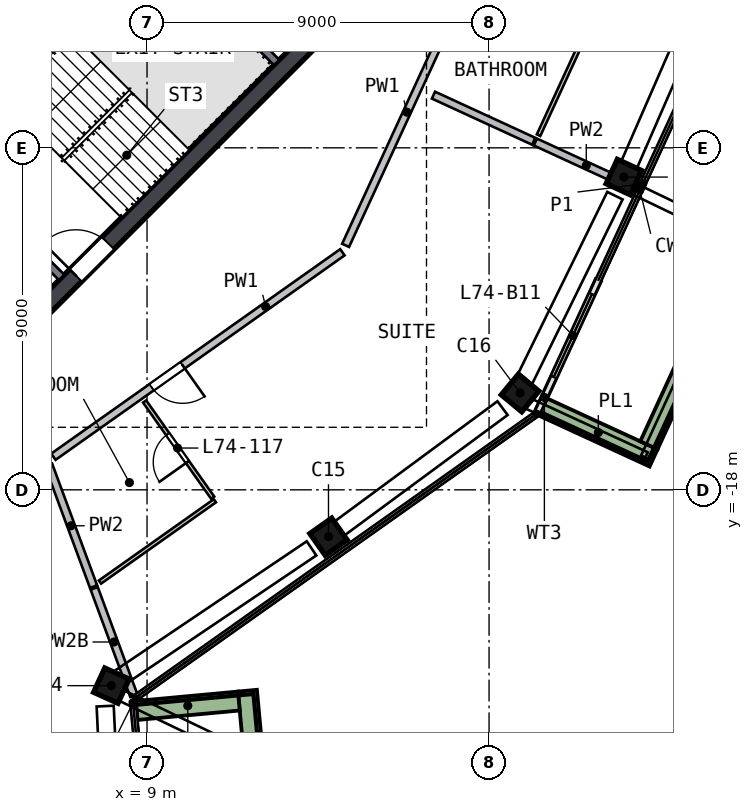
"""IFC4 building model, lengths in metres.
Left out: names, types, materials, properties, quantities, classifications, styles, units other than length and angle.
Written with IfcOpenShell. Run it as: python <this file> out.ifc"""

import sys

from ifc_helpers import new_model, si_unit, direction, frame, frame_2d, origin, origin_2d, place, context, subcontext, project, spatial, rectangle, extrude, element, fill, save


model = new_model("IFC4")
c1 = context("Model", 3, precision=1e-05, world=origin(), true_north=direction((0.0, 1.0)))
c2 = subcontext(c1, "Body", "Model", "MODEL_VIEW")
j1 = project(units=[si_unit("LENGTHUNIT", "METRE"), si_unit("PLANEANGLEUNIT", "RADIAN")], contexts=[c1])
p1 = place(None, origin())
s1 = spatial("IfcSite", under=j1, at=p1, CompositionType="ELEMENT")
p2 = place(p1, origin())
s2 = spatial("IfcBuilding", under=s1, at=p2, CompositionType="ELEMENT")
p3 = place(p2, frame((0.0, 0.0, 299.5)))
s3 = spatial("IfcBuildingStorey", under=s2, at=p3, CompositionType="ELEMENT", Elevation=299.5)
p4 = place(p3, frame((7.929, -23.2, 0.0), z_axis=(0.10991532, 0.038614787, 0.993190576), x_axis=(-0.410477569, -0.908289085, 0.080740963)))
e1 = element("IfcColumn", 1, at=p4, inside=s3, PredefinedType="COLUMN", context=c2, shape_type="SweptSolid", body=[
    extrude(rectangle(XDim=0.7, YDim=0.7, at=origin_2d()), origin(), (0.0, 0.0, 1.0), 3.212),
])
p5 = place(p3, frame((13.664, -19.313, 0.0), z_axis=(0.09133384, 0.065781659, 0.99364526), x_axis=(0.811187112, 0.573853007, -0.112553082)))
e2 = element("IfcColumn", 2, at=p5, inside=s3, PredefinedType="COLUMN", context=c2, shape_type="SweptSolid", body=[
    extrude(rectangle(XDim=0.7, YDim=0.7, at=origin_2d()), origin(), (0.0, 0.0, 1.0), 3.21),
])
p6 = place(p3, frame((18.728, -15.559, 0.0), z_axis=(0.073283156, 0.089627429, 0.993275643), x_axis=(-0.635237432, -0.763590768, 0.115769356)))
e3 = element("IfcColumn", 3, at=p6, inside=s3, PredefinedType="COLUMN", context=c2, shape_type="SweptSolid", body=[
    extrude(rectangle(XDim=0.7, YDim=0.7, at=origin_2d()), origin(), (0.0, 0.0, 1.0), 3.211),
])
p7 = place(p3, frame((21.49, -9.894, 0.0), z_axis=(0.046237437, 0.102589312, 0.993648596), x_axis=(0.41596114, 0.902393906, -0.11252363)))
e4 = element("IfcColumn", 4, at=p7, inside=s3, PredefinedType="COLUMN", context=c2, shape_type="SweptSolid", body=[
    extrude(rectangle(XDim=0.7, YDim=0.7, at=origin_2d()), origin(), (0.0, 0.0, 1.0), 3.21),
])
p8 = place(p3, frame((5.64, -13.841, 0.0), z_axis=(0.0, 0.0, 1.0), x_axis=(0.707106781, 0.707106781, 0.0)))
e5 = element("IfcWall", 5, at=p8, inside=s3, PredefinedType="SHEAR", context=c2, shape_type="SweptSolid", body=[
    extrude(rectangle(XDim=11.598, YDim=0.45, at=frame_2d((5.799, 0.0))), origin(), (0.0, 0.0, 1.0), 3.5),
])
p9 = place(p8, frame((2.099, 0.0, 0.0)))
e6 = element("IfcOpeningElement", 6, at=p9, cuts=e5, PredefinedType="OPENING", context=c2, shape_type="SweptSolid", body=[
    extrude(rectangle(XDim=1.2, YDim=2.1, at=frame_2d((0.6, 1.05))), frame((0.0, 0.235, 0.0), z_axis=(0.0, -1.0, 0.0), x_axis=(1.0, 0.0, 0.0)), (0.0, 0.0, 1.0), 0.47),
])
p10 = place(p3, frame((19.291, -15.927, 0.0), z_axis=(0.0, 0.0, 1.0), x_axis=(0.41817485, 0.908366553, 0.0)))
e7 = element("IfcWall", 7, at=p10, inside=s3, PredefinedType="SOLIDWALL", context=c2, shape_type="SweptSolid", body=[
    extrude(rectangle(XDim=3.787, YDim=0.15, at=frame_2d((1.893, 0.0))), origin(), (0.0, 0.0, 1.0), 2.525),
])
p11 = place(p10, frame((0.987, 0.0, 0.0)))
e8 = element("IfcOpeningElement", 8, at=p11, cuts=e7, PredefinedType="OPENING", context=c2, shape_type="SweptSolid", body=[
    extrude(rectangle(XDim=2.4, YDim=2.4, at=frame_2d((1.2, 1.2))), frame((0.0, 0.085, 0.0), z_axis=(0.0, -1.0, 0.0), x_axis=(1.0, 0.0, 0.0)), (0.0, 0.0, 1.0), 0.17),
])
p12 = place(p3, frame((12.51, -32.671, 0.0), z_axis=(0.0, 0.0, 1.0), x_axis=(-0.092007016, 0.995758359, 0.0)))
e9 = element("IfcWall", 9, at=p12, inside=s3, PredefinedType="SOLIDWALL", context=c2, shape_type="SweptSolid", body=[
    extrude(rectangle(XDim=9.425, YDim=0.5, at=frame_2d((4.713, 0.0))), origin(), (0.0, 0.0, 1.0), 0.7),
])
p13 = place(p3, frame((11.416, -23.558, 0.0), z_axis=(0.0, 0.0, 1.0), x_axis=(-0.995751125, -0.092085269, 0.0)))
e10 = element("IfcWall", 10, at=p13, inside=s3, PredefinedType="SOLIDWALL", context=c2, shape_type="SweptSolid", body=[
    extrude(rectangle(XDim=2.699, YDim=0.5, at=frame_2d((1.35, 0.0))), origin(), (0.0, 0.0, 1.0), 0.7),
])
p14 = place(p3, frame((19.423, -15.822, 0.0), z_axis=(0.0, 0.0, 1.0), x_axis=(0.908343202, -0.418225571, 0.0)))
e11 = element("IfcWall", 11, at=p14, inside=s3, PredefinedType="SOLIDWALL", context=c2, shape_type="SweptSolid", body=[
    extrude(rectangle(XDim=3.199, YDim=0.5, at=frame_2d((1.6, 0.0))), origin(), (0.0, 0.0, 1.0), 0.7),
])
p15 = place(p3, frame((22.206, -16.828, 0.0), z_axis=(0.0, 0.0, 1.0), x_axis=(0.418195112, 0.908357225, 0.0)))
e12 = element("IfcWall", 12, at=p15, inside=s3, PredefinedType="SOLIDWALL", context=c2, shape_type="SweptSolid", body=[
    extrude(rectangle(XDim=13.224, YDim=0.5, at=frame_2d((6.612, 0.0))), origin(), (0.0, 0.0, 1.0), 0.7),
])
p16 = place(p3, frame((9.629, -3.24, 0.0), z_axis=(0.0, 0.0, 1.0), x_axis=(-0.707120946, -0.707092617, 0.0)))
e13 = element("IfcWall", 13, at=p16, inside=s3, PredefinedType="SOLIDWALL", context=c2, shape_type="SweptSolid", body=[
    extrude(rectangle(XDim=8.618, YDim=0.2, at=frame_2d((4.309, 0.0))), origin(), (0.0, 0.0, 1.0), 3.19),
])
p17 = place(p16, frame((7.018, 0.0, 0.0)))
e14 = element("IfcOpeningElement", 14, at=p17, cuts=e13, PredefinedType="OPENING", context=c2, shape_type="SweptSolid", body=[
    extrude(rectangle(XDim=1.2, YDim=2.1, at=frame_2d((0.6, 1.05))), frame((0.0, 0.11, 0.0), z_axis=(0.0, -1.0, 0.0), x_axis=(1.0, 0.0, 0.0)), (0.0, 0.0, 1.0), 0.22),
])
for number, where, z_axis, x_axis in (
    (15, (3.677, -9.334, 0.0), (0.0, 0.0, 1.0), (0.707, -0.707, 0.0)),
    (16, (9.334, -3.677, 0.0), (0.0, 0.0, 1.0), (0.707, -0.707, 0.0)),
):
    element("IfcWall", number, at=place(p3, frame(where, z_axis=z_axis, x_axis=x_axis)), inside=s3, PredefinedType="SOLIDWALL", context=c2, shape_type="SweptSolid", body=[
        extrude(rectangle(XDim=4.35, YDim=0.2, at=frame_2d((2.175, 0.0))), origin(), (0.0, 0.0, 1.0), 3.19),
    ])
p18 = place(p3, frame((14.141, -11.749, 0.0), z_axis=(0.0, 0.0, 1.0), x_axis=(-0.816328241, -0.577588264, 0.0)))
e17 = element("IfcWall", 17, at=p18, inside=s3, PredefinedType="SOLIDWALL", context=c2, shape_type="SweptSolid", body=[
    extrude(rectangle(XDim=9.316, YDim=0.2, at=frame_2d((4.658, 0.0))), origin(), (0.0, 0.0, 1.0), 3.19),
])
p19 = place(p18, frame((5.15, 0.0, 0.0)))
e18 = element("IfcOpeningElement", 18, at=p19, cuts=e17, PredefinedType="OPENING", context=c2, shape_type="SweptSolid", body=[
    extrude(rectangle(XDim=1.0, YDim=2.1, at=frame_2d((0.5, 1.05))), frame((0.0, 0.11, 0.0), z_axis=(0.0, -1.0, 0.0), x_axis=(1.0, 0.0, 0.0)), (0.0, 0.0, 1.0), 0.22),
])
p20 = place(p3, frame((18.037, -3.286, 0.0), z_axis=(0.0, 0.0, 1.0), x_axis=(-0.418184999, -0.908361881, 0.0)))
e19 = element("IfcWall", 19, at=p20, inside=s3, PredefinedType="SOLIDWALL", context=c2, shape_type="SweptSolid", body=[
    extrude(rectangle(XDim=9.116, YDim=0.2, at=frame_2d((4.558, 0.0))), origin(), (0.0, 0.0, 1.0), 3.19),
])
p21 = place(p20, frame((0.2, 0.0, 0.0)))
e20 = element("IfcOpeningElement", 20, at=p21, cuts=e19, PredefinedType="OPENING", context=c2, shape_type="SweptSolid", body=[
    extrude(rectangle(XDim=1.0, YDim=2.1, at=frame_2d((0.5, 1.05))), frame((0.0, 0.11, 0.0), z_axis=(0.0, -1.0, 0.0), x_axis=(1.0, 0.0, 0.0)), (0.0, 0.0, 1.0), 0.22),
])
p22 = place(p3, frame((6.408, -17.342, 0.0), z_axis=(0.0, 0.0, 1.0), x_axis=(0.34661872, -0.93800611, 0.0)))
e21 = element("IfcWall", 21, at=p22, inside=s3, PredefinedType="SOLIDWALL", context=c2, shape_type="SweptSolid", body=[
    extrude(rectangle(XDim=3.418, YDim=0.2, at=frame_2d((1.709, 0.0))), origin(), (0.0, 0.0, 1.0), 3.19),
])
p23 = place(p3, frame((7.609, -20.592, 0.0), z_axis=(0.0, 0.0, 1.0), x_axis=(0.346659445, -0.93799106, 0.0)))
e22 = element("IfcWall", 22, at=p23, inside=s3, PredefinedType="SOLIDWALL", context=c2, shape_type="SweptSolid", body=[
    extrude(rectangle(XDim=3.011, YDim=0.2, at=frame_2d((1.506, 0.0))), origin(), (0.0, 0.0, 1.0), 2.69),
])
p24 = place(p3, frame((16.537, -7.613, 0.0), z_axis=(0.0, 0.0, 1.0), x_axis=(0.908369787, -0.418167825, 0.0)))
e23 = element("IfcWall", 23, at=p24, inside=s3, PredefinedType="SOLIDWALL", context=c2, shape_type="SweptSolid", body=[
    extrude(rectangle(XDim=2.905, YDim=0.2, at=frame_2d((1.452, 0.0))), origin(), (0.0, 0.0, 1.0), 3.19),
])
p25 = place(p3, frame((19.218, -8.847, 0.0), z_axis=(0.0, 0.0, 1.0), x_axis=(0.908353512, -0.418203178, 0.0)))
e24 = element("IfcWall", 24, at=p25, inside=s3, PredefinedType="SOLIDWALL", context=c2, shape_type="SweptSolid", body=[
    extrude(rectangle(XDim=2.952, YDim=0.2, at=frame_2d((1.476, 0.0))), origin(), (0.0, 0.0, 1.0), 3.19),
])
p26 = place(p3, frame((10.785, -18.288, 0.0), z_axis=(0.0, 0.0, 1.0), x_axis=(-0.816326196, -0.577591155, 0.0)))
e25 = element("IfcWall", 25, at=p26, inside=s3, PredefinedType="PARTITIONING", context=c2, shape_type="SweptSolid", body=[
    extrude(rectangle(XDim=3.704, YDim=0.1, at=frame_2d((1.852, 0.0))), origin(), (0.0, 0.0, 1.0), 3.19),
])
p27 = place(p3, frame((10.727, -18.206, 0.0), z_axis=(0.0, 0.0, 1.0), x_axis=(-0.57760427, 0.816316916, 0.0)))
e26 = element("IfcWall", 26, at=p27, inside=s3, PredefinedType="PARTITIONING", context=c2, shape_type="SweptSolid", body=[
    extrude(rectangle(XDim=3.1, YDim=0.1, at=frame_2d((1.55, 0.0))), origin(), (0.0, 0.0, 1.0), 3.19),
])
p28 = place(p27, frame((1.15, 0.0, 0.0)))
e27 = element("IfcOpeningElement", 27, at=p28, cuts=e26, PredefinedType="OPENING", context=c2, shape_type="SweptSolid", body=[
    extrude(rectangle(XDim=0.9, YDim=2.1, at=frame_2d((0.45, 1.05))), frame((0.0, 0.06, 0.0), z_axis=(0.0, -1.0, 0.0), x_axis=(1.0, 0.0, 0.0)), (0.0, 0.0, 1.0), 0.12),
])
p29 = place(p3, frame((20.432, -6.214, 0.0), z_axis=(0.0, 0.0, 1.0), x_axis=(-0.418192161, -0.908358584, 0.0)))
e28 = element("IfcWall", 28, at=p29, inside=s3, PredefinedType="PARTITIONING", context=c2, shape_type="SweptSolid", body=[
    extrude(rectangle(XDim=2.7, YDim=0.1, at=frame_2d((1.35, 0.0))), origin(), (0.0, 0.0, 1.0), 3.19),
])
p30 = place(p11, origin())
e29 = element("IfcDoor", 29, at=p30, inside=s3, OperationType="SLIDING_TO_LEFT", PredefinedType="DOOR", context=c2, shape_type="SweptSolid", body=[
    extrude(rectangle(XDim=2.4, YDim=2.4, at=frame_2d((1.2, 1.2))), frame((0.0, 0.025, 0.0), z_axis=(0.0, -1.0, 0.0), x_axis=(1.0, 0.0, 0.0)), (0.0, 0.0, 1.0), 0.05),
])
fill(e8, e29)
p31 = place(p9, origin())
e30 = element("IfcDoor", 30, at=p31, inside=s3, OperationType="SINGLE_SWING_LEFT", PredefinedType="DOOR", context=c2, shape_type="SweptSolid", body=[
    extrude(rectangle(XDim=1.2, YDim=2.1, at=frame_2d((0.6, 1.05))), frame((0.0, 0.025, 0.0), z_axis=(0.0, -1.0, 0.0), x_axis=(1.0, 0.0, 0.0)), (0.0, 0.0, 1.0), 0.05),
])
fill(e6, e30)
p32 = place(p19, origin())
e31 = element("IfcDoor", 31, at=p32, inside=s3, OperationType="SINGLE_SWING_LEFT", PredefinedType="DOOR", context=c2, shape_type="SweptSolid", body=[
    extrude(rectangle(XDim=1.0, YDim=2.1, at=frame_2d((0.5, 1.05))), frame((0.0, 0.025, 0.0), z_axis=(0.0, -1.0, 0.0), x_axis=(1.0, 0.0, 0.0)), (0.0, 0.0, 1.0), 0.05),
])
fill(e18, e31)
p33 = place(p28, origin())
e32 = element("IfcDoor", 32, at=p33, inside=s3, OperationType="SINGLE_SWING_LEFT", PredefinedType="DOOR", context=c2, shape_type="SweptSolid", body=[
    extrude(rectangle(XDim=0.9, YDim=2.1, at=frame_2d((0.45, 1.05))), frame((0.0, 0.025, 0.0), z_axis=(0.0, -1.0, 0.0), x_axis=(1.0, 0.0, 0.0)), (0.0, 0.0, 1.0), 0.05),
])
fill(e27, e32)
save(model, sys.argv[1])
